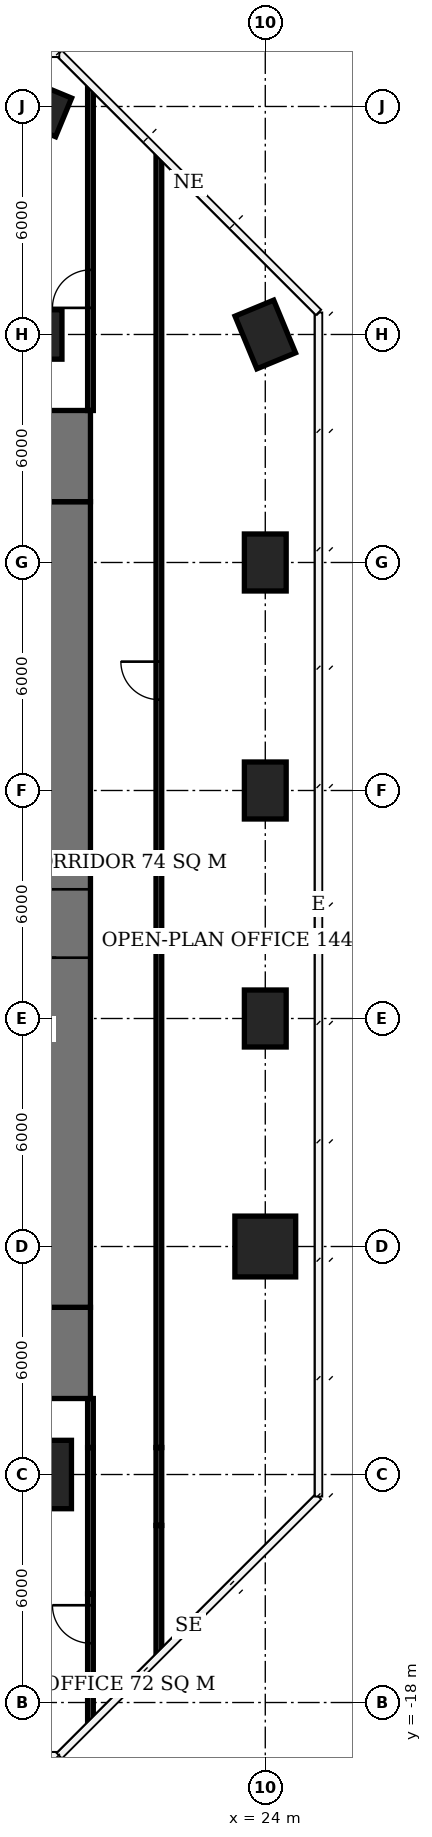
"""IFC4 building model, lengths in metres.
Left out: names, types, materials, properties, quantities, classifications, styles, units other than length and angle.
Written with IfcOpenShell. Run it as: python <this file> out.ifc"""

import sys

from ifc_helpers import new_model, si_unit, direction, frame, frame_2d, origin, origin_2d, place, context, subcontext, project, spatial, rectangle, extrude, element, fill, save


model = new_model("IFC4")
c1 = context("Model", 3, precision=1e-05, world=origin(), true_north=direction((0.0, 1.0)))
c2 = subcontext(c1, "Body", "Model", "MODEL_VIEW")
j1 = project(units=[si_unit("LENGTHUNIT", "METRE"), si_unit("PLANEANGLEUNIT", "RADIAN")], contexts=[c1])
p1 = place(None, origin())
s1 = spatial("IfcSite", under=j1, at=p1, CompositionType="ELEMENT")
p2 = place(p1, origin())
s2 = spatial("IfcBuilding", under=s1, at=p2, CompositionType="ELEMENT")
p3 = place(p2, frame((0.0, 0.0, 220.1)))
s3 = spatial("IfcBuildingStorey", under=s2, at=p3, CompositionType="ELEMENT", Elevation=220.1)
p4 = place(p3, frame((18.0, -12.0, 0.0), z_axis=(0.0, 0.0, 1.0), x_axis=(1.0, 0.0, 0.0)))
e1 = element("IfcColumn", 1, at=p4, inside=s3, PredefinedType="COLUMN", context=c2, shape_type="SweptSolid", body=[
    extrude(rectangle(XDim=1.8, YDim=1.8, at=origin_2d()), origin(), (0.0, 0.0, 1.0), 3.9),
])
p5 = place(p3, frame((18.0, 18.0, 0.0), z_axis=(0.0, 0.0, 1.0), x_axis=(1.0, 0.0, 0.0)))
e2 = element("IfcColumn", 2, at=p5, inside=s3, PredefinedType="COLUMN", context=c2, shape_type="SweptSolid", body=[
    extrude(rectangle(XDim=1.3, YDim=1.3, at=origin_2d()), origin(), (0.0, 0.0, 1.0), 3.9),
])
p6 = place(p3, frame((18.0, 24.0, 0.0), z_axis=(0.0, 0.0, 1.0), x_axis=(0.923879532511, -0.382683432365, 0.0)))
e3 = element("IfcColumn", 3, at=p6, inside=s3, PredefinedType="COLUMN", context=c2, shape_type="SweptSolid", body=[
    extrude(rectangle(XDim=1.5, YDim=1.1, at=origin_2d()), origin(), (0.0, 0.0, 1.0), 3.9),
])
p7 = place(p3, frame((24.0, -6.0, 0.0), z_axis=(0.0, 0.0, 1.0), x_axis=(1.0, 0.0, 0.0)))
e4 = element("IfcColumn", 4, at=p7, inside=s3, PredefinedType="COLUMN", context=c2, shape_type="SweptSolid", body=[
    extrude(rectangle(XDim=1.6, YDim=1.6, at=origin_2d()), origin(), (0.0, 0.0, 1.0), 3.9),
])
for number, where, z_axis, x_axis in (
    (5, (24.0, 0.0, 0.0), (0.0, 0.0, 1.0), (0.0, 1.0, 0.0)),
    (6, (24.0, 6.0, 0.0), (0.0, 0.0, 1.0), (0.0, 1.0, 0.0)),
    (7, (24.0, 12.0, 0.0), (0.0, 0.0, 1.0), (0.0, 1.0, 0.0)),
    (8, (24.0, 18.0, 0.0), (0.0, 0.0, 1.0), (0.383, -0.924, 0.0)),
):
    element("IfcColumn", number, at=place(p3, frame(where, z_axis=z_axis, x_axis=x_axis)), inside=s3, PredefinedType="COLUMN", context=c2, shape_type="SweptSolid", body=[
        extrude(rectangle(XDim=1.5, YDim=1.1, at=origin_2d()), origin(), (0.0, 0.0, 1.0), 3.9),
    ])
p8 = place(p3, frame((18.5, -7.6, 0.0), z_axis=(0.0, 0.0, 1.0), x_axis=(0.0, 1.0, 0.0)))
e9 = element("IfcWall", 9, at=p8, inside=s3, PredefinedType="SHEAR", context=c2, shape_type="SweptSolid", body=[
    extrude(rectangle(XDim=21.2, YDim=1.8, at=frame_2d((10.6, 0.0))), origin(), (0.0, 0.0, 1.0), 3.9),
])
p9 = place(p8, frame((9.2, 0.0, 0.0)))
e10 = element("IfcOpeningElement", 10, at=p9, cuts=e9, PredefinedType="OPENING", context=c2, shape_type="SweptSolid", body=[
    extrude(rectangle(XDim=1.8, YDim=2.4, at=frame_2d((0.9, 1.2))), frame((0.0, 0.91, 0.0), z_axis=(0.0, -1.0, 0.0), x_axis=(1.0, 0.0, 0.0)), (0.0, 0.0, 1.0), 1.82),
])
for number, where, z_axis, x_axis in (
    (11, (18.5, -10.0, 0.0), (0.0, 0.0, 1.0), (0.0, 1.0, 0.0)),
    (12, (18.5, 13.6, 0.0), (0.0, 0.0, 1.0), (0.0, 1.0, 0.0)),
):
    element("IfcWall", number, at=place(p3, frame(where, z_axis=z_axis, x_axis=x_axis)), inside=s3, PredefinedType="SHEAR", context=c2, shape_type="SweptSolid", body=[
        extrude(rectangle(XDim=2.4, YDim=1.8, at=frame_2d((1.2, 0.0))), origin(), (0.0, 0.0, 1.0), 3.9),
    ])
p10 = place(p3, frame((19.4, -18.489, 0.0), z_axis=(0.0, 0.0, 1.0), x_axis=(0.0, 1.0, 0.0)))
e13 = element("IfcWall", 13, at=p10, inside=s3, PredefinedType="PARTITIONING", context=c2, shape_type="SweptSolid", body=[
    extrude(rectangle(XDim=3.349, YDim=0.15, at=frame_2d((1.675, 0.0))), origin(), (0.0, 0.0, 1.0), 3.65),
])
p11 = place(p10, frame((2.049, 0.0, 0.0)))
e14 = element("IfcOpeningElement", 14, at=p11, cuts=e13, PredefinedType="OPENING", context=c2, shape_type="SweptSolid", body=[
    extrude(rectangle(XDim=1.0, YDim=2.1, at=frame_2d((0.5, 1.05))), frame((0.0, 0.085, 0.0), z_axis=(0.0, -1.0, 0.0), x_axis=(1.0, 0.0, 0.0)), (0.0, 0.0, 1.0), 0.17),
])
p12 = place(p3, frame((19.4, -15.14, 0.0), z_axis=(0.0, 0.0, 1.0), x_axis=(0.0, 1.0, 0.0)))
e15 = element("IfcWall", 15, at=p12, inside=s3, PredefinedType="PARTITIONING", context=c2, shape_type="SweptSolid", body=[
    extrude(rectangle(XDim=3.85, YDim=0.15, at=frame_2d((1.925, 0.0))), origin(), (0.0, 0.0, 1.0), 2.65),
])
p13 = place(p3, frame((19.4, -11.29, 0.0), z_axis=(0.0, 0.0, 1.0), x_axis=(0.0, 1.0, 0.0)))
e16 = element("IfcWall", 16, at=p13, inside=s3, PredefinedType="PARTITIONING", context=c2, shape_type="SweptSolid", body=[
    extrude(rectangle(XDim=1.29, YDim=0.15, at=frame_2d((0.645, 0.0))), origin(), (0.0, 0.0, 1.0), 3.65),
])
p14 = place(p3, frame((19.4, 16.0, 0.0), z_axis=(0.0, 0.0, 1.0), x_axis=(0.0, 1.0, 0.0)))
e17 = element("IfcWall", 17, at=p14, inside=s3, PredefinedType="PARTITIONING", context=c2, shape_type="SweptSolid", body=[
    extrude(rectangle(XDim=8.489, YDim=0.15, at=frame_2d((4.245, 0.0))), origin(), (0.0, 0.0, 1.0), 3.65),
])
p15 = place(p14, frame((2.7, 0.0, 0.0)))
e18 = element("IfcOpeningElement", 18, at=p15, cuts=e17, PredefinedType="OPENING", context=c2, shape_type="SweptSolid", body=[
    extrude(rectangle(XDim=1.0, YDim=2.1, at=frame_2d((0.5, 1.05))), frame((0.0, 0.085, 0.0), z_axis=(0.0, -1.0, 0.0), x_axis=(1.0, 0.0, 0.0)), (0.0, 0.0, 1.0), 0.17),
])
p16 = place(p3, frame((21.2, -16.689, 0.0), z_axis=(0.0, 0.0, 1.0), x_axis=(0.0, 1.0, 0.0)))
e19 = element("IfcWall", 19, at=p16, inside=s3, PredefinedType="PARTITIONING", context=c2, shape_type="SweptSolid", body=[
    extrude(rectangle(XDim=3.349, YDim=0.15, at=frame_2d((1.674, 0.0))), origin(), (0.0, 0.0, 1.0), 3.65),
])
p17 = place(p3, frame((21.2, -13.34, 0.0), z_axis=(0.0, 0.0, 1.0), x_axis=(0.0, 1.0, 0.0)))
e20 = element("IfcWall", 20, at=p17, inside=s3, PredefinedType="PARTITIONING", context=c2, shape_type="SweptSolid", body=[
    extrude(rectangle(XDim=2.05, YDim=0.15, at=frame_2d((1.025, 0.0))), origin(), (0.0, 0.0, 1.0), 2.65),
])
p18 = place(p3, frame((21.2, -11.29, 0.0), z_axis=(0.0, 0.0, 1.0), x_axis=(0.0, 1.0, 0.0)))
e21 = element("IfcWall", 21, at=p18, inside=s3, PredefinedType="PARTITIONING", context=c2, shape_type="SweptSolid", body=[
    extrude(rectangle(XDim=33.979, YDim=0.15, at=frame_2d((16.99, 0.0))), origin(), (0.0, 0.0, 1.0), 3.65),
])
p19 = place(p18, frame((19.681, 0.0, 0.0)))
e22 = element("IfcOpeningElement", 22, at=p19, cuts=e21, PredefinedType="OPENING", context=c2, shape_type="SweptSolid", body=[
    extrude(rectangle(XDim=1.0, YDim=2.1, at=frame_2d((0.5, 1.05))), frame((0.0, 0.085, 0.0), z_axis=(0.0, -1.0, 0.0), x_axis=(1.0, 0.0, 0.0)), (0.0, 0.0, 1.0), 0.17),
])
p20 = place(p9, origin())
e23 = element("IfcDoor", 23, at=p20, inside=s3, OperationType="DOUBLE_DOOR_SINGLE_SWING", PredefinedType="DOOR", context=c2, shape_type="SweptSolid", body=[
    extrude(rectangle(XDim=1.8, YDim=2.4, at=frame_2d((0.9, 1.2))), frame((0.0, 0.025, 0.0), z_axis=(0.0, -1.0, 0.0), x_axis=(1.0, 0.0, 0.0)), (0.0, 0.0, 1.0), 0.05),
])
fill(e10, e23)
p21 = place(p11, origin())
e24 = element("IfcDoor", 24, at=p21, inside=s3, OperationType="SINGLE_SWING_RIGHT", PredefinedType="DOOR", context=c2, shape_type="SweptSolid", body=[
    extrude(rectangle(XDim=1.0, YDim=2.1, at=frame_2d((0.5, 1.05))), frame((0.0, 0.025, 0.0), z_axis=(0.0, -1.0, 0.0), x_axis=(1.0, 0.0, 0.0)), (0.0, 0.0, 1.0), 0.05),
])
fill(e14, e24)
p22 = place(p19, origin())
e25 = element("IfcDoor", 25, at=p22, inside=s3, OperationType="SINGLE_SWING_RIGHT", PredefinedType="DOOR", context=c2, shape_type="SweptSolid", body=[
    extrude(rectangle(XDim=1.0, YDim=2.1, at=frame_2d((0.5, 1.05))), frame((0.0, 0.025, 0.0), z_axis=(0.0, -1.0, 0.0), x_axis=(1.0, 0.0, 0.0)), (0.0, 0.0, 1.0), 0.05),
])
fill(e22, e25)
p23 = place(p15, origin())
e26 = element("IfcDoor", 26, at=p23, inside=s3, OperationType="SINGLE_SWING_LEFT", PredefinedType="DOOR", context=c2, shape_type="SweptSolid", body=[
    extrude(rectangle(XDim=1.0, YDim=2.1, at=frame_2d((0.5, 1.05))), frame((0.0, 0.025, 0.0), z_axis=(0.0, -1.0, 0.0), x_axis=(1.0, 0.0, 0.0)), (0.0, 0.0, 1.0), 0.05),
])
fill(e18, e26)
save(model, sys.argv[1])
